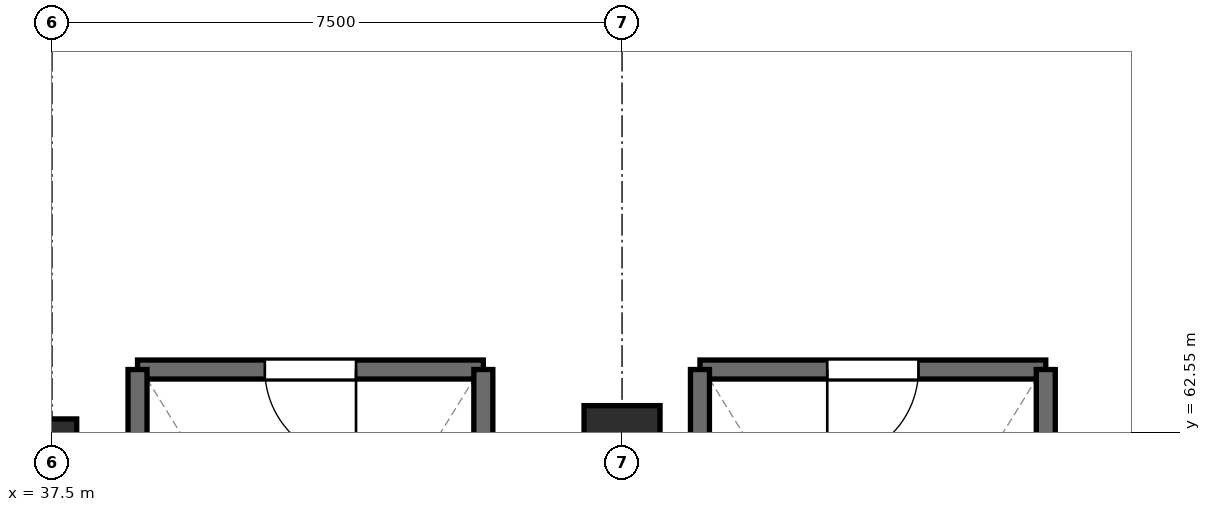
"""IFC4 building model, lengths in metres.
Left out: names, types, materials, properties, quantities, classifications, styles, units other than length and angle.
Written with IfcOpenShell. Run it as: python <this file> out.ifc"""

import sys

from ifc_helpers import new_model, si_unit, direction, frame, frame_2d, origin, origin_2d, place, context, subcontext, project, spatial, rectangle, extrude, element, fill, save


model = new_model("IFC4")
c1 = context("Model", 3, precision=1e-05, world=origin(), true_north=direction((0.0, 1.0)))
c2 = subcontext(c1, "Body", "Model", "MODEL_VIEW")
j1 = project(units=[si_unit("LENGTHUNIT", "METRE"), si_unit("PLANEANGLEUNIT", "RADIAN")], contexts=[c1])
p1 = place(None, origin())
s1 = spatial("IfcSite", under=j1, at=p1, CompositionType="ELEMENT")
p2 = place(p1, origin())
s2 = spatial("IfcBuilding", under=s1, at=p2, CompositionType="ELEMENT")
p3 = place(p2, frame((0.0, 0.0, 4.6)))
s3 = spatial("IfcBuildingStorey", under=s2, at=p3, CompositionType="ELEMENT", Elevation=4.6)
p4 = place(p3, frame((37.5, 62.4, -0.3), z_axis=(0.0, 0.0, 1.0), x_axis=(1.0, 0.0, 0.0)))
e1 = element("IfcColumn", 1, at=p4, inside=s3, PredefinedType="COLUMN", context=c2, shape_type="SweptSolid", body=[
    extrude(rectangle(XDim=0.65, YDim=0.65, at=origin_2d()), origin(), (0.0, 0.0, 1.0), 4.65),
])
p5 = place(p3, frame((45.0, 62.4, -0.3), z_axis=(0.0, 0.0, 1.0), x_axis=(1.0, 0.0, 0.0)))
e2 = element("IfcColumn", 2, at=p5, inside=s3, PredefinedType="COLUMN", context=c2, shape_type="SweptSolid", body=[
    extrude(rectangle(XDim=1.0, YDim=1.0, at=origin_2d()), origin(), (0.0, 0.0, 1.0), 4.65),
])
p6 = place(p3, frame((50.575, 63.375, 0.0), z_axis=(0.0, 0.0, 1.0), x_axis=(-1.0, 0.0, 0.0)))
e3 = element("IfcWall", 3, at=p6, inside=s3, PredefinedType="SHEAR", context=c2, shape_type="SweptSolid", body=[
    extrude(rectangle(XDim=4.55, YDim=0.25, at=frame_2d((2.275, 0.0))), origin(), (0.0, 0.0, 1.0), 4.48),
])
p7 = place(p6, frame((1.675, 0.0, 0.0)))
e4 = element("IfcOpeningElement", 4, at=p7, cuts=e3, PredefinedType="OPENING", context=c2, shape_type="SweptSolid", body=[
    extrude(rectangle(XDim=1.2, YDim=2.2, at=frame_2d((0.6, 1.1))), frame((0.0, 0.137, 0.0), z_axis=(0.0, -1.0, 0.0), x_axis=(1.0, 0.0, 0.0)), (0.0, 0.0, 1.0), 0.274),
])
for number, where, z_axis, x_axis in (
    (5, (46.025, 63.375, 0.0), (0.0, 0.0, 1.0), (0.0, -1.0, 0.0)),
    (6, (50.575, 56.175, 0.0), (0.0, 0.0, 1.0), (0.0, 1.0, 0.0)),
):
    element("IfcWall", number, at=place(p3, frame(where, z_axis=z_axis, x_axis=x_axis)), inside=s3, PredefinedType="SHEAR", context=c2, shape_type="SweptSolid", body=[
        extrude(rectangle(XDim=7.2, YDim=0.25, at=frame_2d((3.6, 0.0))), origin(), (0.0, 0.0, 1.0), 4.48),
    ])
p8 = place(p3, frame((43.175, 63.375, 0.0), z_axis=(0.0, 0.0, 1.0), x_axis=(-1.0, 0.0, 0.0)))
e7 = element("IfcWall", 7, at=p8, inside=s3, PredefinedType="SHEAR", context=c2, shape_type="SweptSolid", body=[
    extrude(rectangle(XDim=4.55, YDim=0.25, at=frame_2d((2.275, 0.0))), origin(), (0.0, 0.0, 1.0), 4.48),
])
p9 = place(p8, frame((1.675, 0.0, 0.0)))
e8 = element("IfcOpeningElement", 8, at=p9, cuts=e7, PredefinedType="OPENING", context=c2, shape_type="SweptSolid", body=[
    extrude(rectangle(XDim=1.2, YDim=2.2, at=frame_2d((0.6, 1.1))), frame((0.0, 0.137, 0.0), z_axis=(0.0, -1.0, 0.0), x_axis=(1.0, 0.0, 0.0)), (0.0, 0.0, 1.0), 0.274),
])
for number, where, z_axis, x_axis in (
    (9, (38.625, 63.375, 0.0), (0.0, 0.0, 1.0), (0.0, -1.0, 0.0)),
    (10, (43.175, 56.175, 0.0), (0.0, 0.0, 1.0), (0.0, 1.0, 0.0)),
):
    element("IfcWall", number, at=place(p3, frame(where, z_axis=z_axis, x_axis=x_axis)), inside=s3, PredefinedType="SHEAR", context=c2, shape_type="SweptSolid", body=[
        extrude(rectangle(XDim=7.2, YDim=0.25, at=frame_2d((3.6, 0.0))), origin(), (0.0, 0.0, 1.0), 4.48),
    ])
p10 = place(p7, origin())
e11 = element("IfcDoor", 11, at=p10, inside=s3, OperationType="SINGLE_SWING_RIGHT", PredefinedType="DOOR", context=c2, shape_type="SweptSolid", body=[
    extrude(rectangle(XDim=1.2, YDim=2.2, at=frame_2d((0.6, 1.1))), frame((0.0, 0.025, 0.0), z_axis=(0.0, -1.0, 0.0), x_axis=(1.0, 0.0, 0.0)), (0.0, 0.0, 1.0), 0.05),
])
fill(e4, e11)
p11 = place(p9, origin())
e12 = element("IfcDoor", 12, at=p11, inside=s3, OperationType="SINGLE_SWING_LEFT", PredefinedType="DOOR", context=c2, shape_type="SweptSolid", body=[
    extrude(rectangle(XDim=1.2, YDim=2.2, at=frame_2d((0.6, 1.1))), frame((0.0, 0.025, 0.0), z_axis=(0.0, -1.0, 0.0), x_axis=(1.0, 0.0, 0.0)), (0.0, 0.0, 1.0), 0.05),
])
fill(e8, e12)
save(model, sys.argv[1])
